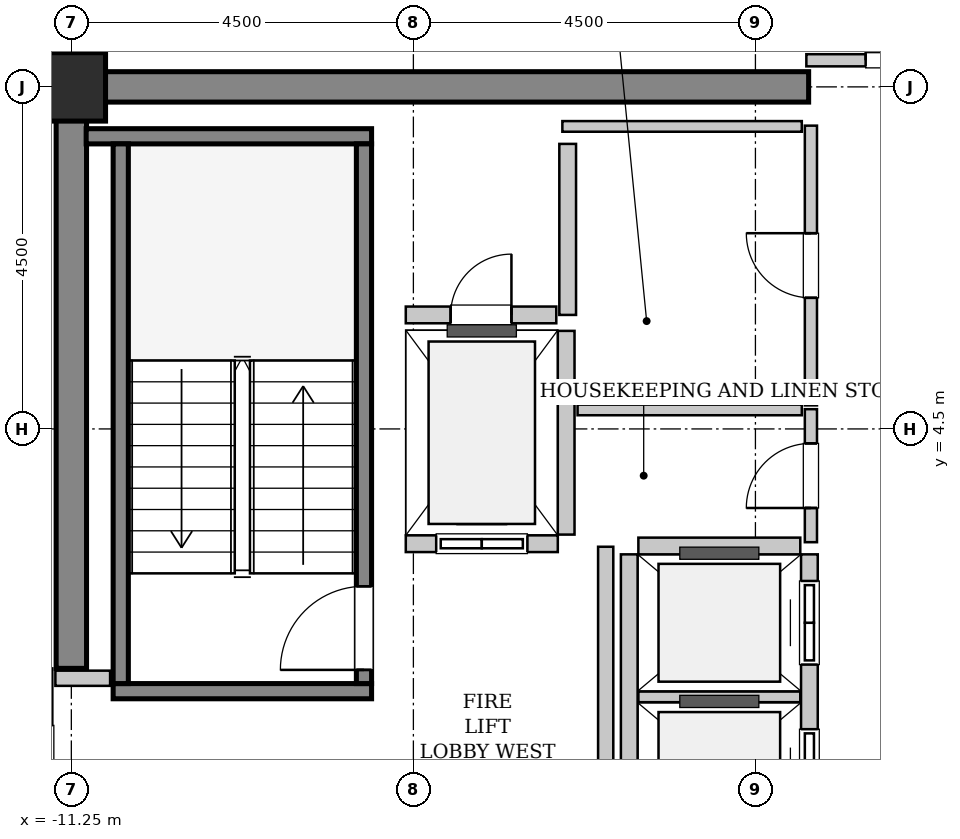
"""IFC4 building model, lengths in metres.
Left out: names, types, materials, properties, quantities, classifications, styles, units other than length and angle.
Written with IfcOpenShell. Run it as: python <this file> out.ifc"""

import sys

from ifc_helpers import new_model, si_unit, direction, frame, frame_2d, origin, origin_2d, place, context, subcontext, project, spatial, rectangle, extrude, source, transform, mapped, element, fill, save


model = new_model("IFC4")
c1 = context("Model", 3, precision=1e-05, world=origin(), true_north=direction((0.0, 1.0)))
c2 = subcontext(c1, "Body", "Model", "MODEL_VIEW")
j1 = project(units=[si_unit("LENGTHUNIT", "METRE"), si_unit("PLANEANGLEUNIT", "RADIAN")], contexts=[c1])
p1 = place(None, origin())
s1 = spatial("IfcSite", under=j1, at=p1, CompositionType="ELEMENT")
p2 = place(p1, origin())
s2 = spatial("IfcBuilding", under=s1, at=p2, CompositionType="ELEMENT")
p3 = place(p2, frame((0.0, 0.0, 330.0)))
s3 = spatial("IfcBuildingStorey", under=s2, at=p3, CompositionType="ELEMENT", Elevation=330.0)
m1 = source(origin(), c2, "Body", "SweptSolid", [
    extrude(rectangle(XDim=9.9, YDim=0.4, at=frame_2d((4.95, 0.0))), origin(), (0.0, 0.0, 1.0), 3.8),
])
p4 = place(p3, frame((-11.45, 9.0, 0.0), z_axis=(0.0, 0.0, 1.0), x_axis=(1.0, 0.0, 0.0)))
e1 = element("IfcWall", 1, at=p4, inside=s3, PredefinedType="SHEAR", context=c2, shape_type="MappedRepresentation", body=[
    mapped(m1, transform((0.0, 0.0, 0.0), x_axis=(1.0, 0.0, 0.0), y_axis=(0.0, 1.0, 0.0), z_axis=(0.0, 0.0, 1.0), scale=1.0)),
])
m2 = source(origin(), c2, "Body", "SweptSolid", [
    extrude(rectangle(XDim=7.45, YDim=0.4, at=frame_2d((3.725, 0.0))), origin(), (0.0, 0.0, 1.0), 3.8),
])
p5 = place(p3, frame((-11.25, 1.35, 0.0), z_axis=(0.0, 0.0, 1.0), x_axis=(0.0, 1.0, 0.0)))
e2 = element("IfcWall", 2, at=p5, inside=s3, PredefinedType="SHEAR", context=c2, shape_type="MappedRepresentation", body=[
    mapped(m2, transform((0.0, 0.0, 0.0), x_axis=(1.0, 0.0, 0.0), y_axis=(0.0, 1.0, 0.0), z_axis=(0.0, 0.0, 1.0), scale=1.0)),
])
m3 = source(origin(), c2, "Body", "SweptSolid", [
    extrude(rectangle(XDim=0.9, YDim=0.9, at=origin_2d()), origin(), (0.0, 0.0, 1.0), 3.8),
])
p6 = place(p3, frame((-11.25, 9.0, 0.0), z_axis=(0.0, 0.0, 1.0), x_axis=(1.0, 0.0, 0.0)))
e3 = element("IfcColumn", 3, at=p6, inside=s3, PredefinedType="COLUMN", context=c2, shape_type="MappedRepresentation", body=[
    mapped(m3, transform((0.0, 0.0, 0.0), x_axis=(1.0, 0.0, 0.0), y_axis=(0.0, 1.0, 0.0), z_axis=(0.0, 0.0, 1.0), scale=1.0)),
])
m4 = source(origin(), c2, "Body", "SweptSolid", [
    extrude(rectangle(XDim=3.4, YDim=0.2, at=frame_2d((1.7, 0.0))), origin(), (0.0, 0.0, 1.0), 3.8),
])
p7 = place(p3, frame((-7.3, 1.05, 0.0), z_axis=(0.0, 0.0, 1.0), x_axis=(-1.0, 0.0, 0.0)))
e4 = element("IfcWall", 4, at=p7, inside=s3, PredefinedType="SOLIDWALL", context=c2, shape_type="MappedRepresentation", body=[
    mapped(m4, transform((0.0, 0.0, 0.0), x_axis=(1.0, 0.0, 0.0), y_axis=(0.0, 1.0, 0.0), z_axis=(0.0, 0.0, 1.0), scale=1.0)),
])
m5 = source(origin(), c2, "Body", "SweptSolid", [
    extrude(rectangle(XDim=3.755, YDim=0.2, at=frame_2d((1.877, 0.0))), origin(), (0.0, 0.0, 1.0), 3.8),
])
p8 = place(p3, frame((-7.3, 8.35, 0.0), z_axis=(0.0, 0.0, 1.0), x_axis=(-1.0, 0.0, 0.0)))
e5 = element("IfcWall", 5, at=p8, inside=s3, PredefinedType="SOLIDWALL", context=c2, shape_type="MappedRepresentation", body=[
    mapped(m5, transform((0.0, 0.0, 0.0), x_axis=(1.0, 0.0, 0.0), y_axis=(0.0, 1.0, 0.0), z_axis=(0.0, 0.0, 1.0), scale=1.0)),
])
m6 = source(origin(), c2, "Body", "SweptSolid", [
    extrude(rectangle(XDim=7.1, YDim=0.2, at=frame_2d((3.55, 0.0))), origin(), (0.0, 0.0, 1.0), 3.8),
])
p9 = place(p3, frame((-7.4, 1.15, 0.0), z_axis=(0.0, 0.0, 1.0), x_axis=(0.0, 1.0, 0.0)))
e6 = element("IfcWall", 6, at=p9, inside=s3, PredefinedType="SOLIDWALL", context=c2, shape_type="MappedRepresentation", body=[
    mapped(m6, transform((0.0, 0.0, 0.0), x_axis=(1.0, 0.0, 0.0), y_axis=(0.0, 1.0, 0.0), z_axis=(0.0, 0.0, 1.0), scale=1.0)),
])
p10 = place(p9, frame((0.18, 0.0, 0.0)))
e7 = element("IfcOpeningElement", 7, at=p10, cuts=e6, PredefinedType="OPENING", context=c2, shape_type="SweptSolid", body=[
    extrude(rectangle(XDim=1.1, YDim=2.15, at=frame_2d((0.55, 1.075))), frame((0.0, 0.11, 0.0), z_axis=(0.0, -1.0, 0.0), x_axis=(1.0, 0.0, 0.0)), (0.0, 0.0, 1.0), 0.22),
])
p11 = place(p3, frame((-10.6, 1.15, 0.0), z_axis=(0.0, 0.0, 1.0), x_axis=(0.0, 1.0, 0.0)))
e8 = element("IfcWall", 8, at=p11, inside=s3, PredefinedType="SOLIDWALL", context=c2, shape_type="MappedRepresentation", body=[
    mapped(m6, transform((0.0, 0.0, 0.0), x_axis=(1.0, 0.0, 0.0), y_axis=(0.0, 1.0, 0.0), z_axis=(0.0, 0.0, 1.0), scale=1.0)),
])
m7 = source(origin(), c2, "Body", "SweptSolid", [
    extrude(rectangle(XDim=2.0, YDim=0.22, at=frame_2d((1.0, 0.0))), origin(), (0.0, 0.0, 1.0), 3.535),
])
p12 = place(p3, frame((-6.85, 2.99, 0.0), z_axis=(0.0, 0.0, 1.0), x_axis=(1.0, 0.0, 0.0)))
e9 = element("IfcWall", 9, at=p12, inside=s3, PredefinedType="SOLIDWALL", context=c2, shape_type="MappedRepresentation", body=[
    mapped(m7, transform((0.0, 0.0, 0.0), x_axis=(1.0, 0.0, 0.0), y_axis=(0.0, 1.0, 0.0), z_axis=(0.0, 0.0, 1.0), scale=1.0)),
])
p13 = place(p12, frame((0.4, 0.0, 0.0)))
e10 = element("IfcOpeningElement", 10, at=p13, cuts=e9, PredefinedType="OPENING", context=c2, shape_type="SweptSolid", body=[
    extrude(rectangle(XDim=1.2, YDim=2.2, at=frame_2d((0.6, 1.1))), frame((0.0, 0.12, 0.0), z_axis=(0.0, -1.0, 0.0), x_axis=(1.0, 0.0, 0.0)), (0.0, 0.0, 1.0), 0.24),
])
m8 = source(origin(), c2, "Body", "SweptSolid", [
    extrude(rectangle(XDim=2.68, YDim=0.22, at=frame_2d((1.34, 0.0))), origin(), (0.0, 0.0, 1.0), 3.535),
])
p14 = place(p3, frame((-4.74, 3.11, 0.0), z_axis=(0.0, 0.0, 1.0), x_axis=(0.0, 1.0, 0.0)))
e11 = element("IfcWall", 11, at=p14, inside=s3, PredefinedType="SOLIDWALL", context=c2, shape_type="MappedRepresentation", body=[
    mapped(m8, transform((0.0, 0.0, 0.0), x_axis=(1.0, 0.0, 0.0), y_axis=(0.0, 1.0, 0.0), z_axis=(0.0, 0.0, 1.0), scale=1.0)),
])
m9 = source(origin(), c2, "Body", "SweptSolid", [
    extrude(rectangle(XDim=5.7, YDim=0.22, at=frame_2d((2.85, 0.0))), origin(), (0.0, 0.0, 1.0), 3.535),
])
p15 = place(p3, frame((-1.54, -2.85, 0.0), z_axis=(0.0, 0.0, 1.0), x_axis=(0.0, 1.0, 0.0)))
e12 = element("IfcWall", 12, at=p15, inside=s3, PredefinedType="SOLIDWALL", context=c2, shape_type="MappedRepresentation", body=[
    mapped(m9, transform((0.0, 0.0, 0.0), x_axis=(1.0, 0.0, 0.0), y_axis=(0.0, 1.0, 0.0), z_axis=(0.0, 0.0, 1.0), scale=1.0)),
])
p16 = place(p15, frame((0.35, 0.0, 0.0)))
e13 = element("IfcOpeningElement", 13, at=p16, cuts=e12, PredefinedType="OPENING", context=c2, shape_type="SweptSolid", body=[
    extrude(rectangle(XDim=1.1, YDim=2.2, at=frame_2d((0.55, 1.1))), frame((0.0, 0.12, 0.0), z_axis=(0.0, -1.0, 0.0), x_axis=(1.0, 0.0, 0.0)), (0.0, 0.0, 1.0), 0.24),
])
p17 = place(p15, frame((2.3, 0.0, 0.0)))
e14 = element("IfcOpeningElement", 14, at=p17, cuts=e12, PredefinedType="OPENING", context=c2, shape_type="SweptSolid", body=[
    extrude(rectangle(XDim=1.1, YDim=2.2, at=frame_2d((0.55, 1.1))), frame((0.0, 0.12, 0.0), z_axis=(0.0, -1.0, 0.0), x_axis=(1.0, 0.0, 0.0)), (0.0, 0.0, 1.0), 0.24),
])
p18 = place(p15, frame((4.25, 0.0, 0.0)))
e15 = element("IfcOpeningElement", 15, at=p18, cuts=e12, PredefinedType="OPENING", context=c2, shape_type="SweptSolid", body=[
    extrude(rectangle(XDim=1.1, YDim=2.2, at=frame_2d((0.55, 1.1))), frame((0.0, 0.12, 0.0), z_axis=(0.0, -1.0, 0.0), x_axis=(1.0, 0.0, 0.0)), (0.0, 0.0, 1.0), 0.24),
])
p19 = place(p3, frame((-3.91, 2.85, 0.0), z_axis=(0.0, 0.0, 1.0), x_axis=(0.0, -1.0, 0.0)))
e16 = element("IfcWall", 16, at=p19, inside=s3, PredefinedType="SOLIDWALL", context=c2, shape_type="MappedRepresentation", body=[
    mapped(m9, transform((0.0, 0.0, 0.0), x_axis=(1.0, 0.0, 0.0), y_axis=(0.0, 1.0, 0.0), z_axis=(0.0, 0.0, 1.0), scale=1.0)),
])
m10 = source(origin(), c2, "Body", "SweptSolid", [
    extrude(rectangle(XDim=2.13, YDim=0.14, at=frame_2d((1.065, 0.0))), origin(), (0.0, 0.0, 1.0), 3.535),
])
p20 = place(p3, frame((-3.79, 0.975, 0.0), z_axis=(0.0, 0.0, 1.0), x_axis=(1.0, 0.0, 0.0)))
e17 = element("IfcWall", 17, at=p20, inside=s3, PredefinedType="PARTITIONING", context=c2, shape_type="MappedRepresentation", body=[
    mapped(m10, transform((0.0, 0.0, 0.0), x_axis=(1.0, 0.0, 0.0), y_axis=(0.0, 1.0, 0.0), z_axis=(0.0, 0.0, 1.0), scale=1.0)),
])
m11 = source(origin(), c2, "Body", "SweptSolid", [
    extrude(rectangle(XDim=2.13, YDim=0.22, at=frame_2d((1.065, 0.0))), origin(), (0.0, 0.0, 1.0), 3.535),
])
p21 = place(p3, frame((-1.66, 2.96, 0.0), z_axis=(0.0, 0.0, 1.0), x_axis=(-1.0, 0.0, 0.0)))
e18 = element("IfcWall", 18, at=p21, inside=s3, PredefinedType="SOLIDWALL", context=c2, shape_type="MappedRepresentation", body=[
    mapped(m11, transform((0.0, 0.0, 0.0), x_axis=(1.0, 0.0, 0.0), y_axis=(0.0, 1.0, 0.0), z_axis=(0.0, 0.0, 1.0), scale=1.0)),
])
m12 = source(origin(), c2, "Body", "SweptSolid", [
    extrude(rectangle(XDim=2.25, YDim=0.22, at=frame_2d((1.125, 0.0))), origin(), (0.0, 0.0, 1.0), 3.535),
])
p22 = place(p3, frame((-4.72, 6.0, 0.0), z_axis=(0.0, 0.0, 1.0), x_axis=(0.0, 1.0, 0.0)))
e19 = element("IfcWall", 19, at=p22, inside=s3, PredefinedType="SOLIDWALL", context=c2, shape_type="MappedRepresentation", body=[
    mapped(m12, transform((0.0, 0.0, 0.0), x_axis=(1.0, 0.0, 0.0), y_axis=(0.0, 1.0, 0.0), z_axis=(0.0, 0.0, 1.0), scale=1.0)),
])
m13 = source(origin(), c2, "Body", "SweptSolid", [
    extrude(rectangle(XDim=1.98, YDim=0.22, at=frame_2d((0.99, 0.0))), origin(), (0.0, 0.0, 1.0), 3.535),
])
p23 = place(p3, frame((-6.85, 6.0, 0.0), z_axis=(0.0, 0.0, 1.0), x_axis=(1.0, 0.0, 0.0)))
e20 = element("IfcWall", 20, at=p23, inside=s3, PredefinedType="SOLIDWALL", context=c2, shape_type="MappedRepresentation", body=[
    mapped(m13, transform((0.0, 0.0, 0.0), x_axis=(1.0, 0.0, 0.0), y_axis=(0.0, 1.0, 0.0), z_axis=(0.0, 0.0, 1.0), scale=1.0)),
])
p24 = place(p23, frame((0.59, 0.0, 0.0)))
e21 = element("IfcOpeningElement", 21, at=p24, cuts=e20, PredefinedType="OPENING", context=c2, shape_type="SweptSolid", body=[
    extrude(rectangle(XDim=0.8, YDim=2.0, at=frame_2d((0.4, 1.0))), frame((0.0, 0.12, 0.0), z_axis=(0.0, -1.0, 0.0), x_axis=(1.0, 0.0, 0.0)), (0.0, 0.0, 1.0), 0.24),
])
m14 = source(origin(), c2, "Body", "SweptSolid", [
    extrude(rectangle(XDim=5.9, YDim=0.2, at=frame_2d((2.95, 0.0))), origin(), (0.0, 0.0, 1.0), 3.535),
])
p25 = place(p3, frame((-4.22, -2.95, 0.0), z_axis=(0.0, 0.0, 1.0), x_axis=(0.0, 1.0, 0.0)))
e22 = element("IfcWall", 22, at=p25, inside=s3, PredefinedType="PARTITIONING", context=c2, shape_type="MappedRepresentation", body=[
    mapped(m14, transform((0.0, 0.0, 0.0), x_axis=(1.0, 0.0, 0.0), y_axis=(0.0, 1.0, 0.0), z_axis=(0.0, 0.0, 1.0), scale=1.0)),
])
m15 = source(origin(), c2, "Body", "SweptSolid", [
    extrude(rectangle(XDim=0.72, YDim=0.2, at=frame_2d((0.36, 0.0))), origin(), (0.0, 0.0, 1.0), 3.535),
])
p26 = place(p3, frame((-11.46, 1.22, 0.0), z_axis=(0.0, 0.0, 1.0), x_axis=(1.0, 0.0, 0.0)))
e23 = element("IfcWall", 23, at=p26, inside=s3, PredefinedType="PARTITIONING", context=c2, shape_type="MappedRepresentation", body=[
    mapped(m15, transform((0.0, 0.0, 0.0), x_axis=(1.0, 0.0, 0.0), y_axis=(0.0, 1.0, 0.0), z_axis=(0.0, 0.0, 1.0), scale=1.0)),
])
m16 = source(origin(), c2, "Body", "SweptSolid", [
    extrude(rectangle(XDim=3.16, YDim=0.16, at=frame_2d((1.58, 0.0))), origin(), (0.0, 0.0, 1.0), 2.625),
])
p27 = place(p3, frame((-1.58, 9.35, 0.0), z_axis=(0.0, 0.0, 1.0), x_axis=(1.0, 0.0, 0.0)))
e24 = element("IfcWall", 24, at=p27, inside=s3, PredefinedType="PARTITIONING", context=c2, shape_type="MappedRepresentation", body=[
    mapped(m16, transform((0.0, 0.0, 0.0), x_axis=(1.0, 0.0, 0.0), y_axis=(0.0, 1.0, 0.0), z_axis=(0.0, 0.0, 1.0), scale=1.0)),
])
p28 = place(p27, frame((0.78, 0.0, 0.0)))
e25 = element("IfcOpeningElement", 25, at=p28, cuts=e24, PredefinedType="OPENING", context=c2, shape_type="SweptSolid", body=[
    extrude(rectangle(XDim=1.6, YDim=2.3, at=frame_2d((0.8, 1.15))), frame((0.0, 0.09, 0.0), z_axis=(0.0, -1.0, 0.0), x_axis=(1.0, 0.0, 0.0)), (0.0, 0.0, 1.0), 0.18),
])
m17 = source(origin(), c2, "Body", "SweptSolid", [
    extrude(rectangle(XDim=1.75, YDim=0.16, at=frame_2d((0.875, 0.0))), origin(), (0.0, 0.0, 1.0), 3.535),
])
p29 = place(p3, frame((-1.52, 3.01, 0.0), z_axis=(0.0, 0.0, 1.0), x_axis=(0.0, 1.0, 0.0)))
e26 = element("IfcWall", 26, at=p29, inside=s3, PredefinedType="PARTITIONING", context=c2, shape_type="MappedRepresentation", body=[
    mapped(m17, transform((0.0, 0.0, 0.0), x_axis=(1.0, 0.0, 0.0), y_axis=(0.0, 1.0, 0.0), z_axis=(0.0, 0.0, 1.0), scale=1.0)),
])
p30 = place(p29, frame((0.45, 0.0, 0.0)))
e27 = element("IfcOpeningElement", 27, at=p30, cuts=e26, PredefinedType="OPENING", context=c2, shape_type="SweptSolid", body=[
    extrude(rectangle(XDim=0.85, YDim=2.1, at=frame_2d((0.425, 1.05))), frame((0.0, 0.09, 0.0), z_axis=(0.0, -1.0, 0.0), x_axis=(1.0, 0.0, 0.0)), (0.0, 0.0, 1.0), 0.18),
])
m18 = source(origin(), c2, "Body", "SweptSolid", [
    extrude(rectangle(XDim=2.95, YDim=0.14, at=frame_2d((1.475, 0.0))), origin(), (0.0, 0.0, 1.0), 3.535),
])
p31 = place(p3, frame((-4.59, 4.75, 0.0), z_axis=(0.0, 0.0, 1.0), x_axis=(1.0, 0.0, 0.0)))
e28 = element("IfcWall", 28, at=p31, inside=s3, PredefinedType="PARTITIONING", context=c2, shape_type="MappedRepresentation", body=[
    mapped(m18, transform((0.0, 0.0, 0.0), x_axis=(1.0, 0.0, 0.0), y_axis=(0.0, 1.0, 0.0), z_axis=(0.0, 0.0, 1.0), scale=1.0)),
])
m19 = source(origin(), c2, "Body", "SweptSolid", [
    extrude(rectangle(XDim=3.68, YDim=0.16, at=frame_2d((1.84, 0.0))), origin(), (0.0, 0.0, 1.0), 3.535),
])
p32 = place(p3, frame((-1.52, 4.81, 0.0), z_axis=(0.0, 0.0, 1.0), x_axis=(0.0, 1.0, 0.0)))
e29 = element("IfcWall", 29, at=p32, inside=s3, PredefinedType="PARTITIONING", context=c2, shape_type="MappedRepresentation", body=[
    mapped(m19, transform((0.0, 0.0, 0.0), x_axis=(1.0, 0.0, 0.0), y_axis=(0.0, 1.0, 0.0), z_axis=(0.0, 0.0, 1.0), scale=1.0)),
])
p33 = place(p32, frame((1.415, 0.0, 0.0)))
e30 = element("IfcOpeningElement", 30, at=p33, cuts=e29, PredefinedType="OPENING", context=c2, shape_type="SweptSolid", body=[
    extrude(rectangle(XDim=0.85, YDim=2.1, at=frame_2d((0.425, 1.05))), frame((0.0, 0.09, 0.0), z_axis=(0.0, -1.0, 0.0), x_axis=(1.0, 0.0, 0.0)), (0.0, 0.0, 1.0), 0.18),
])
m20 = source(origin(), c2, "Body", "SweptSolid", [
    extrude(rectangle(XDim=3.15, YDim=0.14, at=frame_2d((1.575, 0.0))), origin(), (0.0, 0.0, 1.0), 3.535),
])
p34 = place(p3, frame((-4.79, 8.48, 0.0), z_axis=(0.0, 0.0, 1.0), x_axis=(1.0, 0.0, 0.0)))
e31 = element("IfcWall", 31, at=p34, inside=s3, PredefinedType="PARTITIONING", context=c2, shape_type="MappedRepresentation", body=[
    mapped(m20, transform((0.0, 0.0, 0.0), x_axis=(1.0, 0.0, 0.0), y_axis=(0.0, 1.0, 0.0), z_axis=(0.0, 0.0, 1.0), scale=1.0)),
])
m21 = source(origin(), c2, "Body", "SweptSolid", [
    extrude(rectangle(XDim=1.1, YDim=2.15, at=frame_2d((0.55, 1.075))), frame((0.0, 0.025, 0.0), z_axis=(0.0, -1.0, 0.0), x_axis=(1.0, 0.0, 0.0)), (0.0, 0.0, 1.0), 0.05),
])
p35 = place(p10, origin())
e32 = element("IfcDoor", 32, at=p35, inside=s3, OperationType="SINGLE_SWING_LEFT", PredefinedType="DOOR", context=c2, shape_type="MappedRepresentation", body=[
    mapped(m21, transform((0.0, 0.0, 0.0), x_axis=(1.0, 0.0, 0.0), y_axis=(0.0, 1.0, 0.0), z_axis=(0.0, 0.0, 1.0), scale=1.0)),
])
fill(e7, e32)
m22 = source(origin(), c2, "Body", "SweptSolid", [
    extrude(rectangle(XDim=1.2, YDim=2.2, at=frame_2d((0.6, 1.1))), frame((0.0, 0.025, 0.0), z_axis=(0.0, -1.0, 0.0), x_axis=(1.0, 0.0, 0.0)), (0.0, 0.0, 1.0), 0.05),
])
p36 = place(p13, origin())
e33 = element("IfcDoor", 33, at=p36, inside=s3, OperationType="SLIDING_TO_LEFT", PredefinedType="DOOR", context=c2, shape_type="MappedRepresentation", body=[
    mapped(m22, transform((0.0, 0.0, 0.0), x_axis=(1.0, 0.0, 0.0), y_axis=(0.0, 1.0, 0.0), z_axis=(0.0, 0.0, 1.0), scale=1.0)),
])
fill(e10, e33)
m23 = source(origin(), c2, "Body", "SweptSolid", [
    extrude(rectangle(XDim=1.1, YDim=2.2, at=frame_2d((0.55, 1.1))), frame((0.0, 0.025, 0.0), z_axis=(0.0, -1.0, 0.0), x_axis=(1.0, 0.0, 0.0)), (0.0, 0.0, 1.0), 0.05),
])
p37 = place(p17, origin())
e34 = element("IfcDoor", 34, at=p37, inside=s3, OperationType="DOUBLE_DOOR_SLIDING", PredefinedType="DOOR", context=c2, shape_type="MappedRepresentation", body=[
    mapped(m23, transform((0.0, 0.0, 0.0), x_axis=(1.0, 0.0, 0.0), y_axis=(0.0, 1.0, 0.0), z_axis=(0.0, 0.0, 1.0), scale=1.0)),
])
fill(e14, e34)
p38 = place(p18, origin())
e35 = element("IfcDoor", 35, at=p38, inside=s3, OperationType="DOUBLE_DOOR_SLIDING", PredefinedType="DOOR", context=c2, shape_type="MappedRepresentation", body=[
    mapped(m23, transform((0.0, 0.0, 0.0), x_axis=(1.0, 0.0, 0.0), y_axis=(0.0, 1.0, 0.0), z_axis=(0.0, 0.0, 1.0), scale=1.0)),
])
fill(e15, e35)
m24 = source(origin(), c2, "Body", "SweptSolid", [
    extrude(rectangle(XDim=0.8, YDim=2.0, at=frame_2d((0.4, 1.0))), frame((0.0, 0.025, 0.0), z_axis=(0.0, -1.0, 0.0), x_axis=(1.0, 0.0, 0.0)), (0.0, 0.0, 1.0), 0.05),
])
p39 = place(p24, origin())
e36 = element("IfcDoor", 36, at=p39, inside=s3, OperationType="SINGLE_SWING_RIGHT", PredefinedType="TRAPDOOR", context=c2, shape_type="MappedRepresentation", body=[
    mapped(m24, transform((0.0, 0.0, 0.0), x_axis=(1.0, 0.0, 0.0), y_axis=(0.0, 1.0, 0.0), z_axis=(0.0, 0.0, 1.0), scale=1.0)),
])
fill(e21, e36)
m25 = source(origin(), c2, "Body", "SweptSolid", [
    extrude(rectangle(XDim=1.6, YDim=2.3, at=frame_2d((0.8, 1.15))), frame((0.0, 0.025, 0.0), z_axis=(0.0, -1.0, 0.0), x_axis=(1.0, 0.0, 0.0)), (0.0, 0.0, 1.0), 0.05),
])
p40 = place(p28, origin())
e37 = element("IfcDoor", 37, at=p40, inside=s3, OperationType="DOUBLE_DOOR_SINGLE_SWING", PredefinedType="DOOR", context=c2, shape_type="MappedRepresentation", body=[
    mapped(m25, transform((0.0, 0.0, 0.0), x_axis=(1.0, 0.0, 0.0), y_axis=(0.0, 1.0, 0.0), z_axis=(0.0, 0.0, 1.0), scale=1.0)),
])
fill(e25, e37)
m26 = source(origin(), c2, "Body", "SweptSolid", [
    extrude(rectangle(XDim=0.85, YDim=2.1, at=frame_2d((0.425, 1.05))), frame((0.0, 0.025, 0.0), z_axis=(0.0, -1.0, 0.0), x_axis=(1.0, 0.0, 0.0)), (0.0, 0.0, 1.0), 0.05),
])
p41 = place(p30, origin())
e38 = element("IfcDoor", 38, at=p41, inside=s3, OperationType="SINGLE_SWING_LEFT", PredefinedType="DOOR", context=c2, shape_type="MappedRepresentation", body=[
    mapped(m26, transform((0.0, 0.0, 0.0), x_axis=(1.0, 0.0, 0.0), y_axis=(0.0, 1.0, 0.0), z_axis=(0.0, 0.0, 1.0), scale=1.0)),
])
fill(e27, e38)
p42 = place(p33, origin())
e39 = element("IfcDoor", 39, at=p42, inside=s3, OperationType="SINGLE_SWING_RIGHT", PredefinedType="DOOR", context=c2, shape_type="MappedRepresentation", body=[
    mapped(m26, transform((0.0, 0.0, 0.0), x_axis=(1.0, 0.0, 0.0), y_axis=(0.0, 1.0, 0.0), z_axis=(0.0, 0.0, 1.0), scale=1.0)),
])
fill(e30, e39)
save(model, sys.argv[1])
